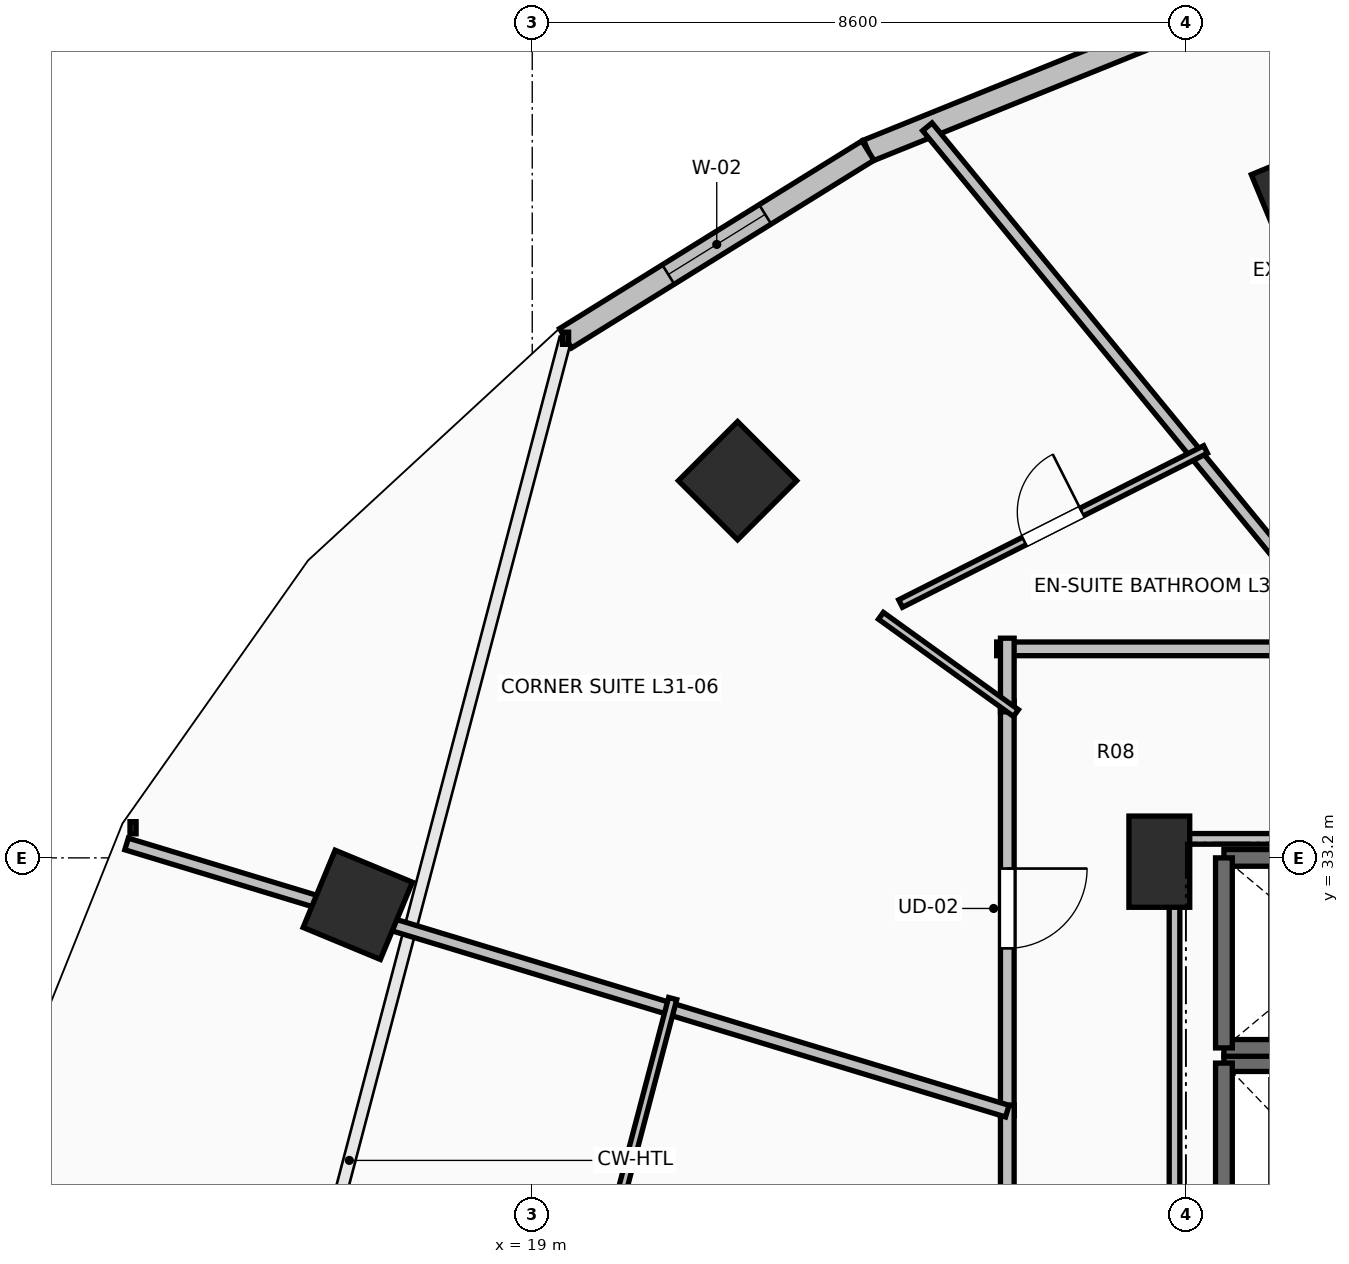
"""IFC4 building model, lengths in metres.
Left out: names, types, materials, properties, quantities, classifications, styles, units other than length and angle.
Written with IfcOpenShell. Run it as: python <this file> out.ifc"""

import sys

from ifc_helpers import new_model, si_unit, direction, frame, frame_2d, origin, origin_2d, place, context, subcontext, project, spatial, rectangle, extrude, element, fill, save


model = new_model("IFC4")
c1 = context("Model", 3, precision=1e-05, world=origin(), true_north=direction((0.0, 1.0)))
c2 = subcontext(c1, "Body", "Model", "MODEL_VIEW")
j1 = project(units=[si_unit("LENGTHUNIT", "METRE"), si_unit("PLANEANGLEUNIT", "RADIAN")], contexts=[c1])
p1 = place(None, origin())
s1 = spatial("IfcSite", under=j1, at=p1, CompositionType="ELEMENT")
p2 = place(p1, origin())
s2 = spatial("IfcBuilding", under=s1, at=p2, CompositionType="ELEMENT")
p3 = place(p2, frame((0.0, 0.0, 117.3)))
s3 = spatial("IfcBuildingStorey", under=s2, at=p3, CompositionType="ELEMENT", Elevation=117.3)
for number, where, z_axis, x_axis in (
    (1, (29.179, 41.891, 0.0), (0.0, 0.0, 1.0), (-0.383, 0.924, 0.0)),
    (2, (21.701, 38.162, 0.0), (0.0, 0.0, 1.0), (-0.707, 0.707, 0.0)),
    (3, (16.705, 32.582, 0.0), (0.0, 0.0, 1.0), (-0.924, 0.383, 0.0)),
):
    element("IfcColumn", number, at=place(p3, frame(where, z_axis=z_axis, x_axis=x_axis)), inside=s3, PredefinedType="COLUMN", context=c2, shape_type="SweptSolid", body=[
        extrude(rectangle(XDim=1.1, YDim=1.1, at=origin_2d()), origin(), (0.0, 0.0, 1.0), 3.5),
    ])
p4 = place(p3, frame((27.25, 33.15, 0.0), z_axis=(0.0, 0.0, 1.0), x_axis=(1.0, 0.0, 0.0)))
e4 = element("IfcColumn", 4, at=p4, inside=s3, PredefinedType="PILASTER", context=c2, shape_type="SweptSolid", body=[
    extrude(rectangle(XDim=0.8, YDim=1.2, at=origin_2d()), origin(), (0.0, 0.0, 1.0), 3.5),
])
p5 = place(p3, frame((27.955, 44.339, 0.0), z_axis=(0.0, 0.0, 1.0), x_axis=(-0.927122233109, -0.374759075775, 0.0)))
e5 = element("IfcWall", 5, at=p5, inside=s3, PredefinedType="STANDARD", context=c2, shape_type="SweptSolid", body=[
    extrude(rectangle(XDim=4.895, YDim=0.3, at=frame_2d((2.448, 0.0))), origin(), (0.0, 0.0, 1.0), 3.24),
])
p6 = place(p3, frame((23.416, 42.505, 0.0), z_axis=(0.0, 0.0, 1.0), x_axis=(-0.849684479743, -0.527291461038, 0.0)))
e6 = element("IfcWall", 6, at=p6, inside=s3, PredefinedType="STANDARD", context=c2, shape_type="SweptSolid", body=[
    extrude(rectangle(XDim=4.681, YDim=0.3, at=frame_2d((2.341, 0.0))), origin(), (0.0, 0.0, 1.0), 3.24),
])
p7 = place(p6, frame((1.591, 0.0, 0.85)))
e7 = element("IfcOpeningElement", 7, at=p7, cuts=e6, PredefinedType="OPENING", context=c2, shape_type="SweptSolid", body=[
    extrude(rectangle(XDim=1.5, YDim=2.19, at=frame_2d((0.75, 1.095))), frame((0.0, 0.165, 0.0), z_axis=(0.0, -1.0, 0.0), x_axis=(1.0, 0.0, 0.0)), (0.0, 0.0, 1.0), 0.33),
])
p8 = place(p3, frame((30.5, 30.5, 0.0), z_axis=(0.0, 0.0, 1.0), x_axis=(-1.0, 0.0, 0.0)))
e8 = element("IfcWall", 8, at=p8, inside=s3, PredefinedType="SHEAR", context=c2, shape_type="SweptSolid", body=[
    extrude(rectangle(XDim=2.4, YDim=0.22, at=frame_2d((1.2, 0.0))), origin(), (0.0, 0.0, 1.0), 3.24),
])
p9 = place(p3, frame((28.1, 30.5, 0.0), z_axis=(0.0, 0.0, 1.0), x_axis=(0.0, -1.0, 0.0)))
e9 = element("IfcWall", 9, at=p9, inside=s3, PredefinedType="SHEAR", context=c2, shape_type="SweptSolid", body=[
    extrude(rectangle(XDim=2.5, YDim=0.22, at=frame_2d((1.25, 0.0))), origin(), (0.0, 0.0, 1.0), 3.24),
])
p10 = place(p3, frame((28.1, 30.7, 0.0), z_axis=(0.0, 0.0, 1.0), x_axis=(1.0, 0.0, 0.0)))
e10 = element("IfcWall", 10, at=p10, inside=s3, PredefinedType="SOLIDWALL", context=c2, shape_type="SweptSolid", body=[
    extrude(rectangle(XDim=3.0, YDim=0.22, at=frame_2d((1.5, 0.0))), origin(), (0.0, 0.0, 1.0), 3.24),
])
p11 = place(p3, frame((31.1, 33.2, 0.0), z_axis=(0.0, 0.0, 1.0), x_axis=(-1.0, 0.0, 0.0)))
e11 = element("IfcWall", 11, at=p11, inside=s3, PredefinedType="SOLIDWALL", context=c2, shape_type="SweptSolid", body=[
    extrude(rectangle(XDim=3.0, YDim=0.22, at=frame_2d((1.5, 0.0))), origin(), (0.0, 0.0, 1.0), 3.24),
])
p12 = place(p11, frame((0.9, 0.0, 0.0)))
e12 = element("IfcOpeningElement", 12, at=p12, cuts=e11, PredefinedType="OPENING", context=c2, shape_type="SweptSolid", body=[
    extrude(rectangle(XDim=1.2, YDim=2.2, at=frame_2d((0.6, 1.1))), frame((0.0, 0.125, 0.0), z_axis=(0.0, -1.0, 0.0), x_axis=(1.0, 0.0, 0.0)), (0.0, 0.0, 1.0), 0.25),
])
p13 = place(p3, frame((28.1, 33.2, 0.0), z_axis=(0.0, 0.0, 1.0), x_axis=(0.0, -1.0, 0.0)))
e13 = element("IfcWall", 13, at=p13, inside=s3, PredefinedType="SOLIDWALL", context=c2, shape_type="SweptSolid", body=[
    extrude(rectangle(XDim=2.5, YDim=0.22, at=frame_2d((1.25, 0.0))), origin(), (0.0, 0.0, 1.0), 3.24),
])
p14 = place(p3, frame((25.25, 35.261, 0.0), z_axis=(0.0, 0.0, 1.0), x_axis=(0.0, -1.0, 0.0)))
e14 = element("IfcWall", 14, at=p14, inside=s3, PredefinedType="PARTITIONING", context=c2, shape_type="SweptSolid", body=[
    extrude(rectangle(XDim=5.453, YDim=0.18, at=frame_2d((2.727, 0.0))), origin(), (0.0, 0.0, 1.0), 2.432),
])
p15 = place(p14, frame((2.201, 0.0, 0.0)))
e15 = element("IfcOpeningElement", 15, at=p15, cuts=e14, PredefinedType="OPENING", context=c2, shape_type="SweptSolid", body=[
    extrude(rectangle(XDim=1.05, YDim=2.2, at=frame_2d((0.525, 1.1))), frame((0.0, 0.105, 0.0), z_axis=(0.0, -1.0, 0.0), x_axis=(1.0, 0.0, 0.0)), (0.0, 0.0, 1.0), 0.21),
])
p16 = place(p3, frame((29.896, 35.95, 0.0), z_axis=(0.0, 0.0, 1.0), x_axis=(-1.0, 0.0, 0.0)))
e16 = element("IfcWall", 16, at=p16, inside=s3, PredefinedType="PARTITIONING", context=c2, shape_type="SweptSolid", body=[
    extrude(rectangle(XDim=4.786, YDim=0.18, at=frame_2d((2.393, 0.0))), origin(), (0.0, 0.0, 1.0), 2.432),
])
p17 = place(p3, frame((25.25, 36.09, 0.0), z_axis=(0.0, 0.0, 1.0), x_axis=(0.0, -1.0, 0.0)))
e17 = element("IfcWall", 17, at=p17, inside=s3, PredefinedType="PARTITIONING", context=c2, shape_type="SweptSolid", body=[
    extrude(rectangle(XDim=0.969, YDim=0.18, at=frame_2d((0.484, 0.0))), origin(), (0.0, 0.0, 1.0), 2.432),
])
p18 = place(p3, frame((25.25, 29.948, 0.0), z_axis=(0.0, 0.0, 1.0), x_axis=(0.0, -1.0, 0.0)))
e18 = element("IfcWall", 18, at=p18, inside=s3, PredefinedType="PARTITIONING", context=c2, shape_type="SweptSolid", body=[
    extrude(rectangle(XDim=3.577, YDim=0.18, at=frame_2d((1.789, 0.0))), origin(), (0.0, 0.0, 1.0), 2.432),
])
p19 = place(p3, frame((24.198, 42.818, 0.0), z_axis=(0.0, 0.0, 1.0), x_axis=(0.634354930471, -0.773041927833, 0.0)))
e19 = element("IfcWall", 19, at=p19, inside=s3, PredefinedType="PARTITIONING", context=c2, shape_type="SweptSolid", body=[
    extrude(rectangle(XDim=8.885, YDim=0.16, at=frame_2d((4.442, 0.0))), origin(), (0.0, 0.0, 1.0), 2.432),
])
p20 = place(p3, frame((23.846, 36.546, 0.0), z_axis=(0.0, 0.0, 1.0), x_axis=(0.892540033684, 0.450968167692, 0.0)))
e20 = element("IfcWall", 20, at=p20, inside=s3, PredefinedType="PARTITIONING", context=c2, shape_type="SweptSolid", body=[
    extrude(rectangle(XDim=4.495, YDim=0.11, at=frame_2d((2.248, 0.0))), origin(), (0.0, 0.0, 1.0), 2.432),
])
p21 = place(p20, frame((1.823, 0.0, 0.0)))
e21 = element("IfcOpeningElement", 21, at=p21, cuts=e20, PredefinedType="OPENING", context=c2, shape_type="SweptSolid", body=[
    extrude(rectangle(XDim=0.85, YDim=2.1, at=frame_2d((0.425, 1.05))), frame((0.0, 0.07, 0.0), z_axis=(0.0, -1.0, 0.0), x_axis=(1.0, 0.0, 0.0)), (0.0, 0.0, 1.0), 0.14),
])
p22 = place(p3, frame((25.364, 35.105, 0.0), z_axis=(0.0, 0.0, 1.0), x_axis=(-0.811375655524, 0.584525059876, 0.0)))
e22 = element("IfcWall", 22, at=p22, inside=s3, PredefinedType="PARTITIONING", context=c2, shape_type="SweptSolid", body=[
    extrude(rectangle(XDim=2.189, YDim=0.11, at=frame_2d((1.094, 0.0))), origin(), (0.0, 0.0, 1.0), 2.432),
])
p23 = place(p3, frame((13.663, 33.383, 0.0), z_axis=(0.0, 0.0, 1.0), x_axis=(0.956933802543, -0.290306213422, 0.0)))
e23 = element("IfcWall", 23, at=p23, inside=s3, PredefinedType="PARTITIONING", context=c2, shape_type="SweptSolid", body=[
    extrude(rectangle(XDim=12.108, YDim=0.16, at=frame_2d((6.054, 0.0))), origin(), (0.0, 0.0, 1.0), 2.432),
])
p24 = place(p3, frame((19.575, 26.515, 0.0), z_axis=(0.0, 0.0, 1.0), x_axis=(0.254478876497, 0.967078332617, 0.0)))
e24 = element("IfcWall", 24, at=p24, inside=s3, PredefinedType="PARTITIONING", context=c2, shape_type="SweptSolid", body=[
    extrude(rectangle(XDim=4.999, YDim=0.11, at=frame_2d((2.5, 0.0))), origin(), (0.0, 0.0, 1.0), 2.432),
])
p25 = place(p3, frame((27.45, 28.196, 0.0), z_axis=(0.0, 0.0, 1.0), x_axis=(0.0, 1.0, 0.0)))
e25 = element("IfcWall", 25, at=p25, inside=s3, PredefinedType="PARTITIONING", context=c2, shape_type="SweptSolid", body=[
    extrude(rectangle(XDim=5.254, YDim=0.14, at=frame_2d((2.627, 0.0))), origin(), (0.0, 0.0, 1.0), 2.432),
])
p26 = place(p3, frame((27.45, 33.45, 0.0), z_axis=(0.0, 0.0, 1.0), x_axis=(1.0, 0.0, 0.0)))
e26 = element("IfcWall", 26, at=p26, inside=s3, PredefinedType="PARTITIONING", context=c2, shape_type="SweptSolid", body=[
    extrude(rectangle(XDim=1.444, YDim=0.14, at=frame_2d((0.722, 0.0))), origin(), (0.0, 0.0, 1.0), 2.432),
])
p27 = place(p7, origin())
e27 = element("IfcWindow", 27, at=p27, inside=s3, PartitioningType="SINGLE_PANEL", PredefinedType="WINDOW", context=c2, shape_type="SweptSolid", body=[
    extrude(rectangle(XDim=1.5, YDim=2.19, at=frame_2d((0.75, 1.095))), frame((0.0, 0.03, 0.0), z_axis=(0.0, -1.0, 0.0), x_axis=(1.0, 0.0, 0.0)), (0.0, 0.0, 1.0), 0.06),
])
fill(e7, e27)
p28 = place(p15, origin())
e28 = element("IfcDoor", 28, at=p28, inside=s3, OperationType="SINGLE_SWING_LEFT", PredefinedType="DOOR", context=c2, shape_type="SweptSolid", body=[
    extrude(rectangle(XDim=1.05, YDim=2.2, at=frame_2d((0.525, 1.1))), frame((0.0, 0.025, 0.0), z_axis=(0.0, -1.0, 0.0), x_axis=(1.0, 0.0, 0.0)), (0.0, 0.0, 1.0), 0.05),
])
fill(e15, e28)
p29 = place(p21, origin())
e29 = element("IfcDoor", 29, at=p29, inside=s3, OperationType="SINGLE_SWING_RIGHT", PredefinedType="DOOR", context=c2, shape_type="SweptSolid", body=[
    extrude(rectangle(XDim=0.85, YDim=2.1, at=frame_2d((0.425, 1.05))), frame((0.0, 0.025, 0.0), z_axis=(0.0, -1.0, 0.0), x_axis=(1.0, 0.0, 0.0)), (0.0, 0.0, 1.0), 0.05),
])
fill(e21, e29)
save(model, sys.argv[1])
